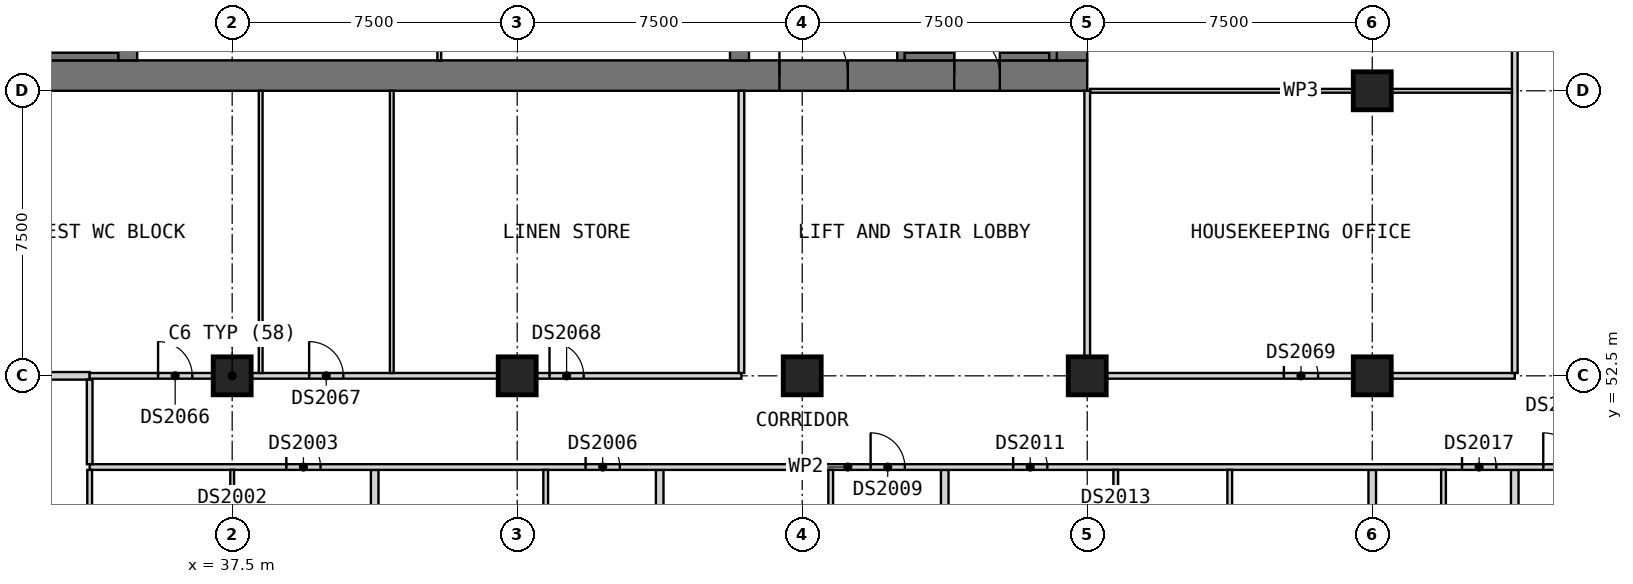
"""IFC4 building model, lengths in metres.
Left out: names, types, materials, properties, quantities, classifications, styles, units other than length and angle.
Written with IfcOpenShell. Run it as: python <this file> out.ifc"""

import sys

from ifc_helpers import new_model, si_unit, direction, frame, frame_2d, origin, origin_2d, place, context, subcontext, project, spatial, rectangle, extrude, element, fill, save


model = new_model("IFC4")
c1 = context("Model", 3, precision=1e-05, world=origin(), true_north=direction((0.0, 1.0)))
c2 = subcontext(c1, "Body", "Model", "MODEL_VIEW")
j1 = project(units=[si_unit("LENGTHUNIT", "METRE"), si_unit("PLANEANGLEUNIT", "RADIAN")], contexts=[c1])
p1 = place(None, origin())
s1 = spatial("IfcSite", under=j1, at=p1, CompositionType="ELEMENT")
p2 = place(p1, origin())
s2 = spatial("IfcBuilding", under=s1, at=p2, CompositionType="ELEMENT")
p3 = place(p2, frame((0.0, 0.0, 162.6)))
s3 = spatial("IfcBuildingStorey", under=s2, at=p3, CompositionType="ELEMENT", Elevation=162.6)
for number, where, z_axis, x_axis in (
    (1, (37.5, 52.5, 0.0), (0.0, 0.0, 1.0), (1.0, 0.0, 0.0)),
    (2, (45.0, 52.5, 0.0), (0.0, 0.0, 1.0), (1.0, 0.0, 0.0)),
    (3, (52.5, 52.5, 0.0), (0.0, 0.0, 1.0), (1.0, 0.0, 0.0)),
    (4, (60.0, 52.5, 0.0), (0.0, 0.0, 1.0), (1.0, 0.0, 0.0)),
    (5, (67.5, 52.5, 0.0), (0.0, 0.0, 1.0), (1.0, 0.0, 0.0)),
    (6, (67.5, 60.0, 0.0), (0.0, 0.0, 1.0), (1.0, 0.0, 0.0)),
):
    element("IfcColumn", number, at=place(p3, frame(where, z_axis=z_axis, x_axis=x_axis)), inside=s3, PredefinedType="COLUMN", context=c2, shape_type="SweptSolid", body=[
        extrude(rectangle(XDim=1.0, YDim=1.0, at=origin_2d()), origin(), (0.0, 0.0, 1.0), 3.6),
    ])
p4 = place(p3, frame((30.0, 60.4, 0.0), z_axis=(0.0, 0.0, 1.0), x_axis=(1.0, 0.0, 0.0)))
e7 = element("IfcWall", 7, at=p4, inside=s3, PredefinedType="SHEAR", context=c2, shape_type="SweptSolid", body=[
    extrude(rectangle(XDim=30.0, YDim=0.8, at=frame_2d((15.0, 0.0))), origin(), (0.0, 0.0, 1.0), 3.6),
])
p5 = place(p4, frame((21.9, 0.0, 0.0)))
e8 = element("IfcOpeningElement", 8, at=p5, cuts=e7, PredefinedType="OPENING", context=c2, shape_type="SweptSolid", body=[
    extrude(rectangle(XDim=1.8, YDim=2.1, at=frame_2d((0.9, 1.05))), frame((0.0, 0.41, 0.0), z_axis=(0.0, -1.0, 0.0), x_axis=(1.0, 0.0, 0.0)), (0.0, 0.0, 1.0), 0.82),
])
p6 = place(p4, frame((26.5, 0.0, 0.0)))
e9 = element("IfcOpeningElement", 9, at=p6, cuts=e7, PredefinedType="OPENING", context=c2, shape_type="SweptSolid", body=[
    extrude(rectangle(XDim=1.2, YDim=2.1, at=frame_2d((0.6, 1.05))), frame((0.0, 0.41, 0.0), z_axis=(0.0, -1.0, 0.0), x_axis=(1.0, 0.0, 0.0)), (0.0, 0.0, 1.0), 0.82),
])
p7 = place(p3, frame((59.6, 60.8, 0.0), z_axis=(0.0, 0.0, 1.0), x_axis=(0.0, 1.0, 0.0)))
e10 = element("IfcWall", 10, at=p7, inside=s3, PredefinedType="SHEAR", context=c2, shape_type="SweptSolid", body=[
    extrude(rectangle(XDim=20.9, YDim=0.8, at=frame_2d((10.45, 0.0))), origin(), (0.0, 0.0, 1.0), 3.6),
])
p8 = place(p7, frame((14.7, 0.0, 0.0)))
e11 = element("IfcOpeningElement", 11, at=p8, cuts=e10, PredefinedType="OPENING", context=c2, shape_type="SweptSolid", body=[
    extrude(rectangle(XDim=1.8, YDim=2.1, at=frame_2d((0.9, 1.05))), frame((0.0, 0.41, 0.0), z_axis=(0.0, -1.0, 0.0), x_axis=(1.0, 0.0, 0.0)), (0.0, 0.0, 1.0), 0.82),
])
for number, where, z_axis, x_axis in (
    (12, (34.75, 60.8, 0.0), (0.0, 0.0, 1.0), (0.0, 1.0, 0.0)),
    (13, (50.85, 60.8, 0.0), (0.0, 0.0, 1.0), (0.0, 1.0, 0.0)),
):
    element("IfcWall", number, at=place(p3, frame(where, z_axis=z_axis, x_axis=x_axis)), inside=s3, PredefinedType="SHEAR", context=c2, shape_type="SweptSolid", body=[
        extrude(rectangle(XDim=3.4, YDim=0.5, at=frame_2d((1.7, 0.0))), origin(), (0.0, 0.0, 1.0), 3.6),
    ])
p9 = place(p3, frame((42.95, 60.8, 0.0), z_axis=(0.0, 0.0, 1.0), x_axis=(0.0, 1.0, 0.0)))
e14 = element("IfcWall", 14, at=p9, inside=s3, PredefinedType="PARTITIONING", context=c2, shape_type="SweptSolid", body=[
    extrude(rectangle(XDim=3.2, YDim=0.1, at=frame_2d((1.6, 0.0))), origin(), (0.0, 0.0, 1.0), 3.19),
])
p10 = place(p3, frame((55.1, 60.8, 0.0), z_axis=(0.0, 0.0, 1.0), x_axis=(0.0, 1.0, 0.0)))
e15 = element("IfcWall", 15, at=p10, inside=s3, PredefinedType="SOLIDWALL", context=c2, shape_type="SweptSolid", body=[
    extrude(rectangle(XDim=7.8, YDim=0.2, at=frame_2d((3.9, 0.0))), origin(), (0.0, 0.0, 1.0), 3.19),
])
p11 = place(p3, frame((31.0, 60.9, 0.0), z_axis=(0.0, 0.0, 1.0), x_axis=(1.0, 0.0, 0.0)))
e16 = element("IfcWall", 16, at=p11, inside=s3, PredefinedType="SOLIDWALL", context=c2, shape_type="SweptSolid", body=[
    extrude(rectangle(XDim=3.5, YDim=0.2, at=frame_2d((1.75, 0.0))), origin(), (0.0, 0.0, 1.0), 3.19),
])
for number, where, z_axis, x_axis in (
    (17, (55.2, 60.9, 0.0), (0.0, 0.0, 1.0), (1.0, 0.0, 0.0)),
    (18, (57.7, 60.9, 0.0), (0.0, 0.0, 1.0), (1.0, 0.0, 0.0)),
):
    element("IfcWall", number, at=place(p3, frame(where, z_axis=z_axis, x_axis=x_axis)), inside=s3, PredefinedType="SOLIDWALL", context=c2, shape_type="SweptSolid", body=[
        extrude(rectangle(XDim=1.3, YDim=0.2, at=frame_2d((0.65, 0.0))), origin(), (0.0, 0.0, 1.0), 3.19),
    ])
p12 = place(p3, frame((59.1, 60.8, 0.0), z_axis=(0.0, 0.0, 1.0), x_axis=(0.0, 1.0, 0.0)))
e19 = element("IfcWall", 19, at=p12, inside=s3, PredefinedType="SOLIDWALL", context=c2, shape_type="SweptSolid", body=[
    extrude(rectangle(XDim=7.7, YDim=0.2, at=frame_2d((3.85, 0.0))), origin(), (0.0, 0.0, 1.0), 3.19),
])
p13 = place(p3, frame((30.0, 52.5, 0.0), z_axis=(0.0, 0.0, 1.0), x_axis=(1.0, 0.0, 0.0)))
e20 = element("IfcWall", 20, at=p13, inside=s3, PredefinedType="PARTITIONING", context=c2, shape_type="SweptSolid", body=[
    extrude(rectangle(XDim=3.75, YDim=0.2, at=frame_2d((1.875, 0.0))), origin(), (0.0, 0.0, 1.0), 3.2),
])
for number, where, z_axis, x_axis in (
    (21, (41.25, 38.31, 0.0), (0.0, 0.0, 1.0), (0.0, 1.0, 0.0)),
    (22, (48.75, 38.31, 0.0), (0.0, 0.0, 1.0), (0.0, 1.0, 0.0)),
    (23, (56.25, 38.31, 0.0), (0.0, 0.0, 1.0), (0.0, 1.0, 0.0)),
):
    element("IfcWall", number, at=place(p3, frame(where, z_axis=z_axis, x_axis=x_axis)), inside=s3, PredefinedType="PARTITIONING", context=c2, shape_type="SweptSolid", body=[
        extrude(rectangle(XDim=11.715, YDim=0.2, at=frame_2d((5.857, 0.0))), origin(), (0.0, 0.0, 1.0), 3.2),
    ])
p14 = place(p3, frame((67.5, 37.5, 0.0), z_axis=(0.0, 0.0, 1.0), x_axis=(0.0, 1.0, 0.0)))
e24 = element("IfcWall", 24, at=p14, inside=s3, PredefinedType="PARTITIONING", context=c2, shape_type="SweptSolid", body=[
    extrude(rectangle(XDim=12.525, YDim=0.2, at=frame_2d((6.262, 0.0))), origin(), (0.0, 0.0, 1.0), 3.2),
])
p15 = place(p3, frame((71.25, 38.31, 0.0), z_axis=(0.0, 0.0, 1.0), x_axis=(0.0, 1.0, 0.0)))
e25 = element("IfcWall", 25, at=p15, inside=s3, PredefinedType="PARTITIONING", context=c2, shape_type="SweptSolid", body=[
    extrude(rectangle(XDim=11.715, YDim=0.2, at=frame_2d((5.857, 0.0))), origin(), (0.0, 0.0, 1.0), 3.2),
])
p16 = place(p3, frame((33.75, 50.1, 0.0), z_axis=(0.0, 0.0, 1.0), x_axis=(1.0, 0.0, 0.0)))
e26 = element("IfcWall", 26, at=p16, inside=s3, PredefinedType="PARTITIONING", context=c2, shape_type="SweptSolid", body=[
    extrude(rectangle(XDim=39.9, YDim=0.15, at=frame_2d((19.95, 0.0))), origin(), (0.0, 0.0, 1.0), 3.2),
])
p17 = place(p16, frame((5.175, 0.0, 0.0)))
e27 = element("IfcOpeningElement", 27, at=p17, cuts=e26, PredefinedType="OPENING", context=c2, shape_type="SweptSolid", body=[
    extrude(rectangle(XDim=0.9, YDim=2.1, at=frame_2d((0.45, 1.05))), frame((0.0, 0.085, 0.0), z_axis=(0.0, -1.0, 0.0), x_axis=(1.0, 0.0, 0.0)), (0.0, 0.0, 1.0), 0.17),
])
p18 = place(p16, frame((13.05, 0.0, 0.0)))
e28 = element("IfcOpeningElement", 28, at=p18, cuts=e26, PredefinedType="OPENING", context=c2, shape_type="SweptSolid", body=[
    extrude(rectangle(XDim=0.9, YDim=2.1, at=frame_2d((0.45, 1.05))), frame((0.0, 0.085, 0.0), z_axis=(0.0, -1.0, 0.0), x_axis=(1.0, 0.0, 0.0)), (0.0, 0.0, 1.0), 0.17),
])
p19 = place(p16, frame((20.55, 0.0, 0.0)))
e29 = element("IfcOpeningElement", 29, at=p19, cuts=e26, PredefinedType="OPENING", context=c2, shape_type="SweptSolid", body=[
    extrude(rectangle(XDim=0.9, YDim=2.1, at=frame_2d((0.45, 1.05))), frame((0.0, 0.085, 0.0), z_axis=(0.0, -1.0, 0.0), x_axis=(1.0, 0.0, 0.0)), (0.0, 0.0, 1.0), 0.17),
])
p20 = place(p16, frame((24.3, 0.0, 0.0)))
e30 = element("IfcOpeningElement", 30, at=p20, cuts=e26, PredefinedType="OPENING", context=c2, shape_type="SweptSolid", body=[
    extrude(rectangle(XDim=0.9, YDim=2.1, at=frame_2d((0.45, 1.05))), frame((0.0, 0.085, 0.0), z_axis=(0.0, -1.0, 0.0), x_axis=(1.0, 0.0, 0.0)), (0.0, 0.0, 1.0), 0.17),
])
p21 = place(p16, frame((36.113, 0.0, 0.0)))
e31 = element("IfcOpeningElement", 31, at=p21, cuts=e26, PredefinedType="OPENING", context=c2, shape_type="SweptSolid", body=[
    extrude(rectangle(XDim=0.9, YDim=2.1, at=frame_2d((0.45, 1.05))), frame((0.0, 0.085, 0.0), z_axis=(0.0, -1.0, 0.0), x_axis=(1.0, 0.0, 0.0)), (0.0, 0.0, 1.0), 0.17),
])
p22 = place(p16, frame((38.25, 0.0, 0.0)))
e32 = element("IfcOpeningElement", 32, at=p22, cuts=e26, PredefinedType="OPENING", context=c2, shape_type="SweptSolid", body=[
    extrude(rectangle(XDim=0.9, YDim=2.1, at=frame_2d((0.45, 1.05))), frame((0.0, 0.085, 0.0), z_axis=(0.0, -1.0, 0.0), x_axis=(1.0, 0.0, 0.0)), (0.0, 0.0, 1.0), 0.17),
])
p23 = place(p3, frame((33.75, 52.5, 0.0), z_axis=(0.0, 0.0, 1.0), x_axis=(1.0, 0.0, 0.0)))
e33 = element("IfcWall", 33, at=p23, inside=s3, PredefinedType="PARTITIONING", context=c2, shape_type="SweptSolid", body=[
    extrude(rectangle(XDim=17.15, YDim=0.15, at=frame_2d((8.575, 0.0))), origin(), (0.0, 0.0, 1.0), 3.2),
])
p24 = place(p23, frame((1.8, 0.0, 0.0)))
e34 = element("IfcOpeningElement", 34, at=p24, cuts=e33, PredefinedType="OPENING", context=c2, shape_type="SweptSolid", body=[
    extrude(rectangle(XDim=0.9, YDim=2.1, at=frame_2d((0.45, 1.05))), frame((0.0, 0.085, 0.0), z_axis=(0.0, -1.0, 0.0), x_axis=(1.0, 0.0, 0.0)), (0.0, 0.0, 1.0), 0.17),
])
p25 = place(p23, frame((5.775, 0.0, 0.0)))
e35 = element("IfcOpeningElement", 35, at=p25, cuts=e33, PredefinedType="OPENING", context=c2, shape_type="SweptSolid", body=[
    extrude(rectangle(XDim=0.9, YDim=2.1, at=frame_2d((0.45, 1.05))), frame((0.0, 0.085, 0.0), z_axis=(0.0, -1.0, 0.0), x_axis=(1.0, 0.0, 0.0)), (0.0, 0.0, 1.0), 0.17),
])
p26 = place(p23, frame((12.1, 0.0, 0.0)))
e36 = element("IfcOpeningElement", 36, at=p26, cuts=e33, PredefinedType="OPENING", context=c2, shape_type="SweptSolid", body=[
    extrude(rectangle(XDim=0.9, YDim=2.1, at=frame_2d((0.45, 1.05))), frame((0.0, 0.085, 0.0), z_axis=(0.0, -1.0, 0.0), x_axis=(1.0, 0.0, 0.0)), (0.0, 0.0, 1.0), 0.17),
])
p27 = place(p3, frame((60.0, 52.5, 0.0), z_axis=(0.0, 0.0, 1.0), x_axis=(1.0, 0.0, 0.0)))
e37 = element("IfcWall", 37, at=p27, inside=s3, PredefinedType="PARTITIONING", context=c2, shape_type="SweptSolid", body=[
    extrude(rectangle(XDim=11.25, YDim=0.15, at=frame_2d((5.625, 0.0))), origin(), (0.0, 0.0, 1.0), 3.2),
])
p28 = place(p27, frame((5.175, 0.0, 0.0)))
e38 = element("IfcOpeningElement", 38, at=p28, cuts=e37, PredefinedType="OPENING", context=c2, shape_type="SweptSolid", body=[
    extrude(rectangle(XDim=0.9, YDim=2.1, at=frame_2d((0.45, 1.05))), frame((0.0, 0.085, 0.0), z_axis=(0.0, -1.0, 0.0), x_axis=(1.0, 0.0, 0.0)), (0.0, 0.0, 1.0), 0.17),
])
p29 = place(p3, frame((33.75, 50.175, 0.0), z_axis=(0.0, 0.0, 1.0), x_axis=(0.0, 1.0, 0.0)))
e39 = element("IfcWall", 39, at=p29, inside=s3, PredefinedType="PARTITIONING", context=c2, shape_type="SweptSolid", body=[
    extrude(rectangle(XDim=2.225, YDim=0.15, at=frame_2d((1.112, 0.0))), origin(), (0.0, 0.0, 1.0), 3.2),
])
p30 = place(p3, frame((71.25, 52.575, 0.0), z_axis=(0.0, 0.0, 1.0), x_axis=(0.0, 1.0, 0.0)))
e40 = element("IfcWall", 40, at=p30, inside=s3, PredefinedType="PARTITIONING", context=c2, shape_type="SweptSolid", body=[
    extrude(rectangle(XDim=11.85, YDim=0.15, at=frame_2d((5.925, 0.0))), origin(), (0.0, 0.0, 1.0), 3.2),
])
p31 = place(p30, frame((9.225, 0.0, 0.0)))
e41 = element("IfcOpeningElement", 41, at=p31, cuts=e40, PredefinedType="OPENING", context=c2, shape_type="SweptSolid", body=[
    extrude(rectangle(XDim=0.9, YDim=2.1, at=frame_2d((0.45, 1.05))), frame((0.0, 0.085, 0.0), z_axis=(0.0, -1.0, 0.0), x_axis=(1.0, 0.0, 0.0)), (0.0, 0.0, 1.0), 0.17),
])
p32 = place(p3, frame((60.075, 60.0, 0.0), z_axis=(0.0, 0.0, 1.0), x_axis=(1.0, 0.0, 0.0)))
e42 = element("IfcWall", 42, at=p32, inside=s3, PredefinedType="PARTITIONING", context=c2, shape_type="SweptSolid", body=[
    extrude(rectangle(XDim=11.1, YDim=0.1, at=frame_2d((5.55, 0.0))), origin(), (0.0, 0.0, 1.0), 3.2),
])
p33 = place(p3, frame((37.5, 45.3, 0.0), z_axis=(0.0, 0.0, 1.0), x_axis=(0.0, 1.0, 0.0)))
e43 = element("IfcWall", 43, at=p33, inside=s3, PredefinedType="PARTITIONING", context=c2, shape_type="SweptSolid", body=[
    extrude(rectangle(XDim=4.725, YDim=0.1, at=frame_2d((2.362, 0.0))), origin(), (0.0, 0.0, 1.0), 3.2),
])
p34 = place(p33, frame((1.925, 0.0, 0.0)))
e44 = element("IfcOpeningElement", 44, at=p34, cuts=e43, PredefinedType="OPENING", context=c2, shape_type="SweptSolid", body=[
    extrude(rectangle(XDim=0.9, YDim=2.1, at=frame_2d((0.45, 1.05))), frame((0.0, 0.06, 0.0), z_axis=(0.0, -1.0, 0.0), x_axis=(1.0, 0.0, 0.0)), (0.0, 0.0, 1.0), 0.12),
])
for number, where, z_axis, x_axis in (
    (45, (38.25, 52.575, 0.0), (0.0, 0.0, 1.0), (0.0, 1.0, 0.0)),
    (46, (41.7, 52.575, 0.0), (0.0, 0.0, 1.0), (0.0, 1.0, 0.0)),
):
    element("IfcWall", number, at=place(p3, frame(where, z_axis=z_axis, x_axis=x_axis)), inside=s3, PredefinedType="PARTITIONING", context=c2, shape_type="SweptSolid", body=[
        extrude(rectangle(XDim=7.425, YDim=0.1, at=frame_2d((3.712, 0.0))), origin(), (0.0, 0.0, 1.0), 3.2),
    ])
for number, where, z_axis, x_axis in (
    (47, (33.75, 45.312, 0.0), (0.0, 0.0, 1.0), (0.0, 1.0, 0.0)),
    (48, (45.75, 45.312, 0.0), (0.0, 0.0, 1.0), (0.0, 1.0, 0.0)),
    (49, (53.25, 45.312, 0.0), (0.0, 0.0, 1.0), (0.0, 1.0, 0.0)),
):
    element("IfcWall", number, at=place(p3, frame(where, z_axis=z_axis, x_axis=x_axis)), inside=s3, PredefinedType="PARTITIONING", context=c2, shape_type="SweptSolid", body=[
        extrude(rectangle(XDim=4.712, YDim=0.125, at=frame_2d((2.356, 0.0))), origin(), (0.0, 0.0, 1.0), 3.2),
    ])
p35 = place(p3, frame((60.75, 45.312, 0.0), z_axis=(0.0, 0.0, 1.0), x_axis=(0.0, 1.0, 0.0)))
e50 = element("IfcWall", 50, at=p35, inside=s3, PredefinedType="PARTITIONING", context=c2, shape_type="SweptSolid", body=[
    extrude(rectangle(XDim=4.712, YDim=0.125, at=frame_2d((2.356, 0.0))), origin(), (0.0, 0.0, 1.0), 3.2),
])
p36 = place(p35, frame((1.913, 0.0, 0.0)))
e51 = element("IfcOpeningElement", 51, at=p36, cuts=e50, PredefinedType="OPENING", context=c2, shape_type="SweptSolid", body=[
    extrude(rectangle(XDim=0.9, YDim=2.1, at=frame_2d((0.45, 1.05))), frame((0.0, 0.073, 0.0), z_axis=(0.0, -1.0, 0.0), x_axis=(1.0, 0.0, 0.0)), (0.0, 0.0, 1.0), 0.145),
])
for number, where, z_axis, x_axis in (
    (52, (63.75, 45.312, 0.0), (0.0, 0.0, 1.0), (0.0, 1.0, 0.0)),
    (53, (69.375, 45.312, 0.0), (0.0, 0.0, 1.0), (0.0, 1.0, 0.0)),
):
    element("IfcWall", number, at=place(p3, frame(where, z_axis=z_axis, x_axis=x_axis)), inside=s3, PredefinedType="PARTITIONING", context=c2, shape_type="SweptSolid", body=[
        extrude(rectangle(XDim=4.712, YDim=0.125, at=frame_2d((2.356, 0.0))), origin(), (0.0, 0.0, 1.0), 3.2),
    ])
for number, where, z_axis, x_axis in (
    (54, (50.9, 52.575, 0.0), (0.0, 0.0, 1.0), (0.0, 1.0, 0.0)),
    (55, (60.0, 52.575, 0.0), (0.0, 0.0, 1.0), (0.0, 1.0, 0.0)),
):
    element("IfcWall", number, at=place(p3, frame(where, z_axis=z_axis, x_axis=x_axis)), inside=s3, PredefinedType="PARTITIONING", context=c2, shape_type="SweptSolid", body=[
        extrude(rectangle(XDim=7.425, YDim=0.15, at=frame_2d((3.712, 0.0))), origin(), (0.0, 0.0, 1.0), 3.2),
    ])
p37 = place(p5, origin())
e56 = element("IfcDoor", 56, at=p37, inside=s3, OperationType="DOUBLE_DOOR_SINGLE_SWING", PredefinedType="DOOR", context=c2, shape_type="SweptSolid", body=[
    extrude(rectangle(XDim=1.8, YDim=2.1, at=frame_2d((0.9, 1.05))), frame((0.0, 0.025, 0.0), z_axis=(0.0, -1.0, 0.0), x_axis=(1.0, 0.0, 0.0)), (0.0, 0.0, 1.0), 0.05),
])
fill(e8, e56)
p38 = place(p6, origin())
e57 = element("IfcDoor", 57, at=p38, inside=s3, OperationType="SINGLE_SWING_LEFT", PredefinedType="DOOR", context=c2, shape_type="SweptSolid", body=[
    extrude(rectangle(XDim=1.2, YDim=2.1, at=frame_2d((0.6, 1.05))), frame((0.0, 0.025, 0.0), z_axis=(0.0, -1.0, 0.0), x_axis=(1.0, 0.0, 0.0)), (0.0, 0.0, 1.0), 0.05),
])
fill(e9, e57)
p39 = place(p17, origin())
e58 = element("IfcDoor", 58, at=p39, inside=s3, OperationType="SINGLE_SWING_RIGHT", PredefinedType="DOOR", context=c2, shape_type="SweptSolid", body=[
    extrude(rectangle(XDim=0.9, YDim=2.1, at=frame_2d((0.45, 1.05))), frame((0.0, 0.025, 0.0), z_axis=(0.0, -1.0, 0.0), x_axis=(1.0, 0.0, 0.0)), (0.0, 0.0, 1.0), 0.05),
])
fill(e27, e58)
p40 = place(p18, origin())
e59 = element("IfcDoor", 59, at=p40, inside=s3, OperationType="SINGLE_SWING_RIGHT", PredefinedType="DOOR", context=c2, shape_type="SweptSolid", body=[
    extrude(rectangle(XDim=0.9, YDim=2.1, at=frame_2d((0.45, 1.05))), frame((0.0, 0.025, 0.0), z_axis=(0.0, -1.0, 0.0), x_axis=(1.0, 0.0, 0.0)), (0.0, 0.0, 1.0), 0.05),
])
fill(e28, e59)
p41 = place(p19, origin())
e60 = element("IfcDoor", 60, at=p41, inside=s3, OperationType="SINGLE_SWING_RIGHT", PredefinedType="DOOR", context=c2, shape_type="SweptSolid", body=[
    extrude(rectangle(XDim=0.9, YDim=2.1, at=frame_2d((0.45, 1.05))), frame((0.0, 0.025, 0.0), z_axis=(0.0, -1.0, 0.0), x_axis=(1.0, 0.0, 0.0)), (0.0, 0.0, 1.0), 0.05),
])
fill(e29, e60)
p42 = place(p20, origin())
e61 = element("IfcDoor", 61, at=p42, inside=s3, OperationType="SINGLE_SWING_RIGHT", PredefinedType="DOOR", context=c2, shape_type="SweptSolid", body=[
    extrude(rectangle(XDim=0.9, YDim=2.1, at=frame_2d((0.45, 1.05))), frame((0.0, 0.025, 0.0), z_axis=(0.0, -1.0, 0.0), x_axis=(1.0, 0.0, 0.0)), (0.0, 0.0, 1.0), 0.05),
])
fill(e30, e61)
p43 = place(p21, origin())
e62 = element("IfcDoor", 62, at=p43, inside=s3, OperationType="SINGLE_SWING_RIGHT", PredefinedType="DOOR", context=c2, shape_type="SweptSolid", body=[
    extrude(rectangle(XDim=0.9, YDim=2.1, at=frame_2d((0.45, 1.05))), frame((0.0, 0.025, 0.0), z_axis=(0.0, -1.0, 0.0), x_axis=(1.0, 0.0, 0.0)), (0.0, 0.0, 1.0), 0.05),
])
fill(e31, e62)
p44 = place(p22, origin())
e63 = element("IfcDoor", 63, at=p44, inside=s3, OperationType="SINGLE_SWING_LEFT", PredefinedType="DOOR", context=c2, shape_type="SweptSolid", body=[
    extrude(rectangle(XDim=0.9, YDim=2.1, at=frame_2d((0.45, 1.05))), frame((0.0, 0.025, 0.0), z_axis=(0.0, -1.0, 0.0), x_axis=(1.0, 0.0, 0.0)), (0.0, 0.0, 1.0), 0.05),
])
fill(e32, e63)
p45 = place(p24, origin())
e64 = element("IfcDoor", 64, at=p45, inside=s3, OperationType="SINGLE_SWING_LEFT", PredefinedType="DOOR", context=c2, shape_type="SweptSolid", body=[
    extrude(rectangle(XDim=0.9, YDim=2.1, at=frame_2d((0.45, 1.05))), frame((0.0, 0.025, 0.0), z_axis=(0.0, -1.0, 0.0), x_axis=(1.0, 0.0, 0.0)), (0.0, 0.0, 1.0), 0.05),
])
fill(e34, e64)
p46 = place(p25, origin())
e65 = element("IfcDoor", 65, at=p46, inside=s3, OperationType="SINGLE_SWING_LEFT", PredefinedType="DOOR", context=c2, shape_type="SweptSolid", body=[
    extrude(rectangle(XDim=0.9, YDim=2.1, at=frame_2d((0.45, 1.05))), frame((0.0, 0.025, 0.0), z_axis=(0.0, -1.0, 0.0), x_axis=(1.0, 0.0, 0.0)), (0.0, 0.0, 1.0), 0.05),
])
fill(e35, e65)
p47 = place(p26, origin())
e66 = element("IfcDoor", 66, at=p47, inside=s3, OperationType="SINGLE_SWING_LEFT", PredefinedType="DOOR", context=c2, shape_type="SweptSolid", body=[
    extrude(rectangle(XDim=0.9, YDim=2.1, at=frame_2d((0.45, 1.05))), frame((0.0, 0.025, 0.0), z_axis=(0.0, -1.0, 0.0), x_axis=(1.0, 0.0, 0.0)), (0.0, 0.0, 1.0), 0.05),
])
fill(e36, e66)
p48 = place(p28, origin())
e67 = element("IfcDoor", 67, at=p48, inside=s3, OperationType="SINGLE_SWING_LEFT", PredefinedType="DOOR", context=c2, shape_type="SweptSolid", body=[
    extrude(rectangle(XDim=0.9, YDim=2.1, at=frame_2d((0.45, 1.05))), frame((0.0, 0.025, 0.0), z_axis=(0.0, -1.0, 0.0), x_axis=(1.0, 0.0, 0.0)), (0.0, 0.0, 1.0), 0.05),
])
fill(e38, e67)
save(model, sys.argv[1])
